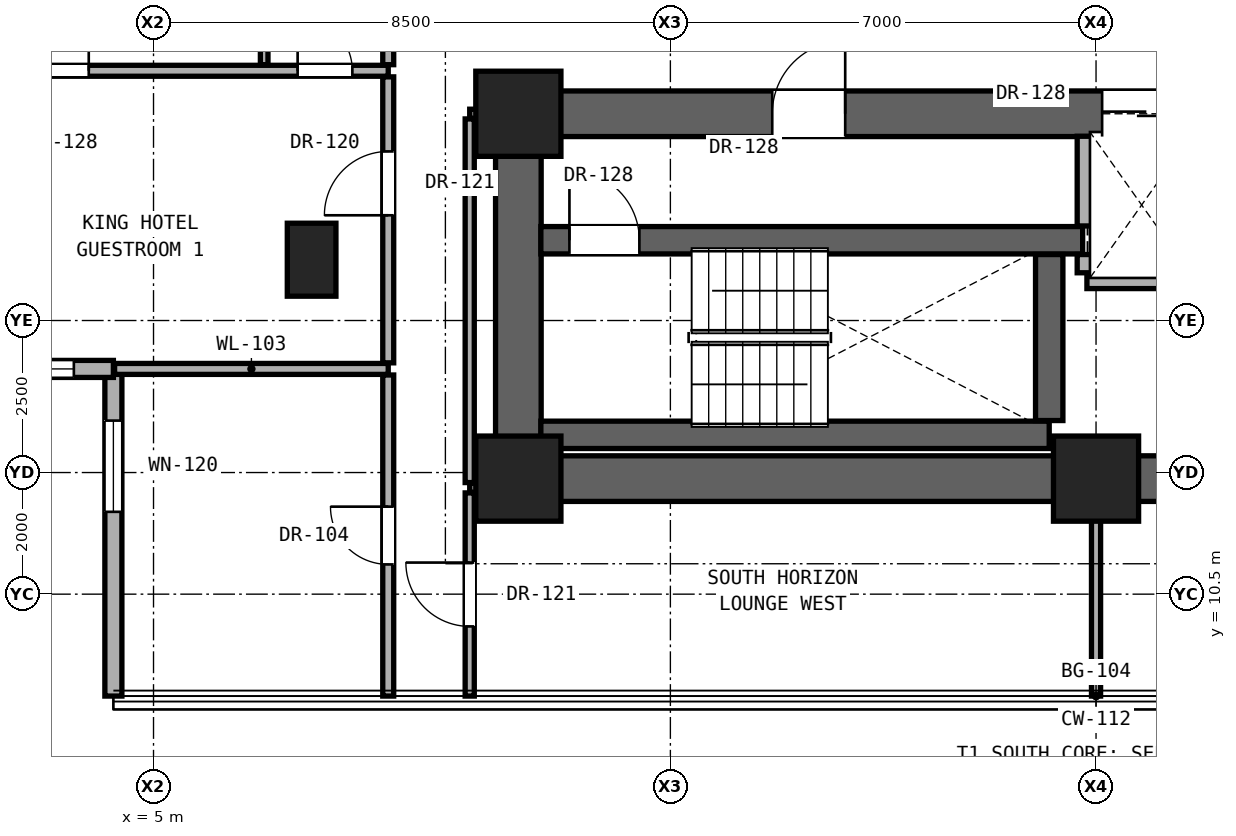
"""IFC4 building model, lengths in metres.
Left out: names, types, materials, properties, quantities, classifications, styles, units other than length and angle.
Written with IfcOpenShell. Run it as: python <this file> out.ifc"""

import sys

from ifc_helpers import new_model, si_unit, direction, frame, frame_2d, origin, origin_2d, place, context, subcontext, project, spatial, rectangle, extrude, element, fill, save


model = new_model("IFC4")
c1 = context("Model", 3, precision=1e-05, world=origin(), true_north=direction((0.0, 1.0)))
c2 = subcontext(c1, "Body", "Model", "MODEL_VIEW")
j1 = project(units=[si_unit("LENGTHUNIT", "METRE"), si_unit("PLANEANGLEUNIT", "RADIAN")], contexts=[c1])
p1 = place(None, origin())
s1 = spatial("IfcSite", under=j1, at=p1, CompositionType="ELEMENT")
p2 = place(p1, origin())
s2 = spatial("IfcBuilding", under=s1, at=p2, CompositionType="ELEMENT")
p3 = place(p2, frame((0.0, 0.0, 29.0)))
s3 = spatial("IfcBuildingStorey", under=s2, at=p3, CompositionType="ELEMENT", Elevation=29.0)
for number, where, z_axis, x_axis in (
    (1, (11.0, 12.4, 0.0), (0.0, 0.0, 1.0), (1.0, 0.0, 0.0)),
    (2, (20.5, 12.4, 0.0), (0.0, 0.0, 1.0), (1.0, 0.0, 0.0)),
    (3, (11.0, 18.4, 0.0), (0.0, 0.0, 1.0), (1.0, 0.0, 0.0)),
):
    element("IfcColumn", number, at=place(p3, frame(where, z_axis=z_axis, x_axis=x_axis)), inside=s3, PredefinedType="COLUMN", context=c2, shape_type="SweptSolid", body=[
        extrude(rectangle(XDim=1.4, YDim=1.4, at=origin_2d()), origin(), (0.0, 0.0, 1.0), 3.3),
    ])
p4 = place(p3, frame((7.6, 16.0, 0.0), z_axis=(0.0, 0.0, 1.0), x_axis=(1.0, 0.0, 0.0)))
e4 = element("IfcColumn", 4, at=p4, inside=s3, PredefinedType="PILASTER", context=c2, shape_type="SweptSolid", body=[
    extrude(rectangle(XDim=0.8, YDim=1.2, at=origin_2d()), origin(), (0.0, 0.0, 1.0), 3.3),
])
p5 = place(p3, frame((11.0, 12.4, 0.0), z_axis=(0.0, 0.0, 1.0), x_axis=(1.0, 0.0, 0.0)))
e5 = element("IfcWall", 5, at=p5, inside=s3, PredefinedType="SHEAR", context=c2, shape_type="SweptSolid", body=[
    extrude(rectangle(XDim=19.0, YDim=0.75, at=frame_2d((9.5, 0.0))), origin(), (0.0, 0.0, 1.0), 3.06),
])
p6 = place(p3, frame((11.0, 12.4, 0.0), z_axis=(0.0, 0.0, 1.0), x_axis=(0.0, 1.0, 0.0)))
e6 = element("IfcWall", 6, at=p6, inside=s3, PredefinedType="SHEAR", context=c2, shape_type="SweptSolid", body=[
    extrude(rectangle(XDim=6.0, YDim=0.75, at=frame_2d((3.0, 0.0))), origin(), (0.0, 0.0, 1.0), 3.06),
])
p7 = place(p3, frame((11.0, 18.4, 0.0), z_axis=(0.0, 0.0, 1.0), x_axis=(1.0, 0.0, 0.0)))
e7 = element("IfcWall", 7, at=p7, inside=s3, PredefinedType="SHEAR", context=c2, shape_type="SweptSolid", body=[
    extrude(rectangle(XDim=19.0, YDim=0.75, at=frame_2d((9.5, 0.0))), origin(), (0.0, 0.0, 1.0), 3.06),
])
p8 = place(p7, frame((4.175, 0.0, 0.0)))
e8 = element("IfcOpeningElement", 8, at=p8, cuts=e7, PredefinedType="OPENING", context=c2, shape_type="SweptSolid", body=[
    extrude(rectangle(XDim=1.2, YDim=2.25, at=frame_2d((0.6, 1.125))), frame((0.0, 0.385, 0.0), z_axis=(0.0, -1.0, 0.0), x_axis=(1.0, 0.0, 0.0)), (0.0, 0.0, 1.0), 0.77),
])
p9 = place(p7, frame((9.6, 0.0, 0.0)))
e9 = element("IfcOpeningElement", 9, at=p9, cuts=e7, PredefinedType="OPENING", context=c2, shape_type="SweptSolid", body=[
    extrude(rectangle(XDim=1.3, YDim=2.3, at=frame_2d((0.65, 1.15))), frame((0.0, 0.385, 0.0), z_axis=(0.0, -1.0, 0.0), x_axis=(1.0, 0.0, 0.0)), (0.0, 0.0, 1.0), 0.77),
])
p10 = place(p7, frame((11.9, 0.0, 0.0)))
e10 = element("IfcOpeningElement", 10, at=p10, cuts=e7, PredefinedType="OPENING", context=c2, shape_type="SweptSolid", body=[
    extrude(rectangle(XDim=1.3, YDim=2.3, at=frame_2d((0.65, 1.15))), frame((0.0, 0.385, 0.0), z_axis=(0.0, -1.0, 0.0), x_axis=(1.0, 0.0, 0.0)), (0.0, 0.0, 1.0), 0.77),
])
p11 = place(p7, frame((14.3, 0.0, 0.0)))
e11 = element("IfcOpeningElement", 11, at=p11, cuts=e7, PredefinedType="OPENING", context=c2, shape_type="SweptSolid", body=[
    extrude(rectangle(XDim=1.3, YDim=2.3, at=frame_2d((0.65, 1.15))), frame((0.0, 0.385, 0.0), z_axis=(0.0, -1.0, 0.0), x_axis=(1.0, 0.0, 0.0)), (0.0, 0.0, 1.0), 0.77),
])
p12 = place(p7, frame((16.6, 0.0, 0.0)))
e12 = element("IfcOpeningElement", 12, at=p12, cuts=e7, PredefinedType="OPENING", context=c2, shape_type="SweptSolid", body=[
    extrude(rectangle(XDim=1.3, YDim=2.3, at=frame_2d((0.65, 1.15))), frame((0.0, 0.385, 0.0), z_axis=(0.0, -1.0, 0.0), x_axis=(1.0, 0.0, 0.0)), (0.0, 0.0, 1.0), 0.77),
])
p13 = place(p3, frame((4.34, 14.204, 0.0), z_axis=(0.0, 0.0, 1.0), x_axis=(0.0, -1.0, 0.0)))
e13 = element("IfcWall", 13, at=p13, inside=s3, PredefinedType="SOLIDWALL", context=c2, shape_type="SweptSolid", body=[
    extrude(rectangle(XDim=5.38, YDim=0.28, at=frame_2d((2.69, 0.0))), origin(), (0.0, 0.0, 1.0), 3.04),
])
p14 = place(p13, frame((0.85, 0.0, 0.79)))
e14 = element("IfcOpeningElement", 14, at=p14, cuts=e13, PredefinedType="OPENING", context=c2, shape_type="SweptSolid", body=[
    extrude(rectangle(XDim=1.5, YDim=2.1, at=frame_2d((0.75, 1.05))), frame((0.0, 0.15, 0.0), z_axis=(0.0, -1.0, 0.0), x_axis=(1.0, 0.0, 0.0)), (0.0, 0.0, 1.0), 0.3),
])
p15 = place(p3, frame((-1.04, 14.204, 0.0), z_axis=(0.0, 0.0, 1.0), x_axis=(1.0, 0.0, 0.0)))
e15 = element("IfcWall", 15, at=p15, inside=s3, PredefinedType="SOLIDWALL", context=c2, shape_type="SweptSolid", body=[
    extrude(rectangle(XDim=5.38, YDim=0.28, at=frame_2d((2.69, 0.0))), origin(), (0.0, 0.0, 1.0), 3.04),
])
p16 = place(p15, frame((3.63, 0.0, 0.85)))
e16 = element("IfcOpeningElement", 16, at=p16, cuts=e15, PredefinedType="OPENING", context=c2, shape_type="SweptSolid", body=[
    extrude(rectangle(XDim=1.1, YDim=2.0, at=frame_2d((0.55, 1.0))), frame((0.0, 0.15, 0.0), z_axis=(0.0, -1.0, 0.0), x_axis=(1.0, 0.0, 0.0)), (0.0, 0.0, 1.0), 0.3),
])
p17 = place(p3, frame((10.2, 12.25, 0.0), z_axis=(0.0, 0.0, 1.0), x_axis=(1.0, 0.0, 0.0)))
e17 = element("IfcWall", 17, at=p17, inside=s3, PredefinedType="PARTITIONING", context=c2, shape_type="SweptSolid", body=[
    extrude(rectangle(XDim=0.43, YDim=0.15, at=frame_2d((0.215, 0.0))), origin(), (0.0, 0.0, 1.0), 3.06),
])
p18 = place(p3, frame((11.37, 13.12, 0.0), z_axis=(0.0, 0.0, 1.0), x_axis=(1.0, 0.0, 0.0)))
e18 = element("IfcWall", 18, at=p18, inside=s3, PredefinedType="SHEAR", context=c2, shape_type="SweptSolid", body=[
    extrude(rectangle(XDim=8.36, YDim=0.45, at=frame_2d((4.18, 0.0))), origin(), (0.0, 0.0, 1.0), 3.06),
])
p19 = place(p3, frame((4.36, 14.204, 0.0), z_axis=(0.0, 0.0, 1.0), x_axis=(1.0, 0.0, 0.0)))
e19 = element("IfcWall", 19, at=p19, inside=s3, PredefinedType="PARTITIONING", context=c2, shape_type="SweptSolid", body=[
    extrude(rectangle(XDim=4.5, YDim=0.18, at=frame_2d((2.25, 0.0))), origin(), (0.0, 0.0, 1.0), 3.06),
])
p20 = place(p3, frame((20.35, 15.65, 0.0), z_axis=(0.0, 0.0, 1.0), x_axis=(1.0, 0.0, 0.0)))
e20 = element("IfcWall", 20, at=p20, inside=s3, PredefinedType="SOLIDWALL", context=c2, shape_type="SweptSolid", body=[
    extrude(rectangle(XDim=4.15, YDim=0.25, at=frame_2d((2.075, 0.0))), origin(), (0.0, 0.0, 1.0), 3.06),
])
p21 = place(p3, frame((11.37, 16.32, 0.0), z_axis=(0.0, 0.0, 1.0), x_axis=(1.0, 0.0, 0.0)))
e21 = element("IfcWall", 21, at=p21, inside=s3, PredefinedType="SHEAR", context=c2, shape_type="SweptSolid", body=[
    extrude(rectangle(XDim=8.91, YDim=0.45, at=frame_2d((4.455, 0.0))), origin(), (0.0, 0.0, 1.0), 3.06),
])
p22 = place(p21, frame((0.47, 0.0, 0.0)))
e22 = element("IfcOpeningElement", 22, at=p22, cuts=e21, PredefinedType="OPENING", context=c2, shape_type="SweptSolid", body=[
    extrude(rectangle(XDim=1.15, YDim=2.2, at=frame_2d((0.575, 1.1))), frame((0.0, 0.235, 0.0), z_axis=(0.0, -1.0, 0.0), x_axis=(1.0, 0.0, 0.0)), (0.0, 0.0, 1.0), 0.47),
])
p23 = place(p3, frame((10.2, 18.4, 0.0), z_axis=(0.0, 0.0, 1.0), x_axis=(1.0, 0.0, 0.0)))
e23 = element("IfcWall", 23, at=p23, inside=s3, PredefinedType="PARTITIONING", context=c2, shape_type="SweptSolid", body=[
    extrude(rectangle(XDim=0.43, YDim=0.15, at=frame_2d((0.215, 0.0))), origin(), (0.0, 0.0, 1.0), 2.436),
])
p24 = place(p3, frame((-1.04, 19.107, 0.0), z_axis=(0.0, 0.0, 1.0), x_axis=(1.0, 0.0, 0.0)))
e24 = element("IfcWall", 24, at=p24, inside=s3, PredefinedType="PARTITIONING", context=c2, shape_type="SweptSolid", body=[
    extrude(rectangle(XDim=9.9, YDim=0.18, at=frame_2d((4.95, 0.0))), origin(), (0.0, 0.0, 1.0), 2.125),
])
p25 = place(p24, frame((4.125, 0.0, 0.0)))
e25 = element("IfcOpeningElement", 25, at=p25, cuts=e24, PredefinedType="OPENING", context=c2, shape_type="SweptSolid", body=[
    extrude(rectangle(XDim=0.85, YDim=2.01, at=frame_2d((0.425, 1.005))), frame((0.0, 0.1, 0.0), z_axis=(0.0, -1.0, 0.0), x_axis=(1.0, 0.0, 0.0)), (0.0, 0.0, 1.0), 0.2),
])
p26 = place(p24, frame((8.41, 0.0, 0.0)))
e26 = element("IfcOpeningElement", 26, at=p26, cuts=e24, PredefinedType="OPENING", context=c2, shape_type="SweptSolid", body=[
    extrude(rectangle(XDim=0.9, YDim=2.1, at=frame_2d((0.45, 1.05))), frame((0.0, 0.1, 0.0), z_axis=(0.0, -1.0, 0.0), x_axis=(1.0, 0.0, 0.0)), (0.0, 0.0, 1.0), 0.2),
])
p27 = place(p3, frame((6.82, 19.207, 0.0), z_axis=(0.0, 0.0, 1.0), x_axis=(0.0, 1.0, 0.0)))
e27 = element("IfcWall", 27, at=p27, inside=s3, PredefinedType="PARTITIONING", context=c2, shape_type="SweptSolid", body=[
    extrude(rectangle(XDim=2.52, YDim=0.125, at=frame_2d((1.26, 0.0))), origin(), (0.0, 0.0, 1.0), 3.06),
])
p28 = place(p3, frame((8.86, 8.824, 0.0), z_axis=(0.0, 0.0, 1.0), x_axis=(0.0, 1.0, 0.0)))
e28 = element("IfcWall", 28, at=p28, inside=s3, PredefinedType="PARTITIONING", context=c2, shape_type="SweptSolid", body=[
    extrude(rectangle(XDim=5.28, YDim=0.18, at=frame_2d((2.64, 0.0))), origin(), (0.0, 0.0, 1.0), 3.06),
])
p29 = place(p28, frame((2.165, 0.0, 0.0)))
e29 = element("IfcOpeningElement", 29, at=p29, cuts=e28, PredefinedType="OPENING", context=c2, shape_type="SweptSolid", body=[
    extrude(rectangle(XDim=0.95, YDim=2.15, at=frame_2d((0.475, 1.075))), frame((0.0, 0.1, 0.0), z_axis=(0.0, -1.0, 0.0), x_axis=(1.0, 0.0, 0.0)), (0.0, 0.0, 1.0), 0.2),
])
p30 = place(p3, frame((8.86, 14.304, 0.0), z_axis=(0.0, 0.0, 1.0), x_axis=(0.0, 1.0, 0.0)))
e30 = element("IfcWall", 30, at=p30, inside=s3, PredefinedType="PARTITIONING", context=c2, shape_type="SweptSolid", body=[
    extrude(rectangle(XDim=4.703, YDim=0.18, at=frame_2d((2.352, 0.0))), origin(), (0.0, 0.0, 1.0), 2.436),
])
p31 = place(p30, frame((2.427, 0.0, 0.0)))
e31 = element("IfcOpeningElement", 31, at=p31, cuts=e30, PredefinedType="OPENING", context=c2, shape_type="SweptSolid", body=[
    extrude(rectangle(XDim=1.05, YDim=2.2, at=frame_2d((0.525, 1.1))), frame((0.0, 0.1, 0.0), z_axis=(0.0, -1.0, 0.0), x_axis=(1.0, 0.0, 0.0)), (0.0, 0.0, 1.0), 0.2),
])
p32 = place(p3, frame((8.86, 19.207, 0.0), z_axis=(0.0, 0.0, 1.0), x_axis=(0.0, 1.0, 0.0)))
e32 = element("IfcWall", 32, at=p32, inside=s3, PredefinedType="PARTITIONING", context=c2, shape_type="SweptSolid", body=[
    extrude(rectangle(XDim=2.52, YDim=0.18, at=frame_2d((1.26, 0.0))), origin(), (0.0, 0.0, 1.0), 3.06),
])
p33 = place(p3, frame((10.2, 8.824, 0.0), z_axis=(0.0, 0.0, 1.0), x_axis=(0.0, 1.0, 0.0)))
e33 = element("IfcWall", 33, at=p33, inside=s3, PredefinedType="PARTITIONING", context=c2, shape_type="SweptSolid", body=[
    extrude(rectangle(XDim=3.341, YDim=0.15, at=frame_2d((1.67, 0.0))), origin(), (0.0, 0.0, 1.0), 3.06),
])
p34 = place(p33, frame((1.146, 0.0, 0.0)))
e34 = element("IfcOpeningElement", 34, at=p34, cuts=e33, PredefinedType="OPENING", context=c2, shape_type="SweptSolid", body=[
    extrude(rectangle(XDim=1.05, YDim=2.2, at=frame_2d((0.525, 1.1))), frame((0.0, 0.085, 0.0), z_axis=(0.0, -1.0, 0.0), x_axis=(1.0, 0.0, 0.0)), (0.0, 0.0, 1.0), 0.17),
])
p35 = place(p3, frame((10.2, 12.335, 0.0), z_axis=(0.0, 0.0, 1.0), x_axis=(0.0, 1.0, 0.0)))
e35 = element("IfcWall", 35, at=p35, inside=s3, PredefinedType="PARTITIONING", context=c2, shape_type="SweptSolid", body=[
    extrude(rectangle(XDim=5.98, YDim=0.15, at=frame_2d((2.99, 0.0))), origin(), (0.0, 0.0, 1.0), 2.436),
])
p36 = place(p3, frame((19.73, 13.355, 0.0), z_axis=(0.0, 0.0, 1.0), x_axis=(0.0, 1.0, 0.0)))
e36 = element("IfcWall", 36, at=p36, inside=s3, PredefinedType="SHEAR", context=c2, shape_type="SweptSolid", body=[
    extrude(rectangle(XDim=2.73, YDim=0.45, at=frame_2d((1.365, 0.0))), origin(), (0.0, 0.0, 1.0), 3.06),
])
p37 = place(p3, frame((20.315, 15.785, 0.0), z_axis=(0.0, 0.0, 1.0), x_axis=(0.0, 1.0, 0.0)))
e37 = element("IfcWall", 37, at=p37, inside=s3, PredefinedType="SOLIDWALL", context=c2, shape_type="SweptSolid", body=[
    extrude(rectangle(XDim=0.3, YDim=0.25, at=frame_2d((0.15, 0.0))), origin(), (0.0, 0.0, 1.0), 3.06),
])
p38 = place(p3, frame((20.315, 16.555, 0.0), z_axis=(0.0, 0.0, 1.0), x_axis=(0.0, 1.0, 0.0)))
e38 = element("IfcWall", 38, at=p38, inside=s3, PredefinedType="SOLIDWALL", context=c2, shape_type="SweptSolid", body=[
    extrude(rectangle(XDim=1.475, YDim=0.25, at=frame_2d((0.738, 0.0))), origin(), (0.0, 0.0, 1.0), 3.06),
])
p39 = place(p3, frame((20.5, 8.824, 0.0), z_axis=(0.0, 0.0, 1.0), x_axis=(0.0, 1.0, 0.0)))
e39 = element("IfcWall", 39, at=p39, inside=s3, PredefinedType="PARTITIONING", context=c2, shape_type="SweptSolid", body=[
    extrude(rectangle(XDim=3.206, YDim=0.15, at=frame_2d((1.603, 0.0))), origin(), (0.0, 0.0, 1.0), 3.06),
])
p40 = place(p14, origin())
e40 = element("IfcWindow", 40, at=p40, inside=s3, PartitioningType="SINGLE_PANEL", PredefinedType="WINDOW", context=c2, shape_type="SweptSolid", body=[
    extrude(rectangle(XDim=1.5, YDim=2.1, at=frame_2d((0.75, 1.05))), frame((0.0, 0.03, 0.0), z_axis=(0.0, -1.0, 0.0), x_axis=(1.0, 0.0, 0.0)), (0.0, 0.0, 1.0), 0.06),
])
fill(e14, e40)
p41 = place(p16, origin())
e41 = element("IfcWindow", 41, at=p41, inside=s3, PartitioningType="SINGLE_PANEL", PredefinedType="WINDOW", context=c2, shape_type="SweptSolid", body=[
    extrude(rectangle(XDim=1.1, YDim=2.0, at=frame_2d((0.55, 1.0))), frame((0.0, 0.03, 0.0), z_axis=(0.0, -1.0, 0.0), x_axis=(1.0, 0.0, 0.0)), (0.0, 0.0, 1.0), 0.06),
])
fill(e16, e41)
p42 = place(p8, origin())
e42 = element("IfcDoor", 42, at=p42, inside=s3, OperationType="SINGLE_SWING_RIGHT", PredefinedType="DOOR", context=c2, shape_type="SweptSolid", body=[
    extrude(rectangle(XDim=1.2, YDim=2.25, at=frame_2d((0.6, 1.125))), frame((0.0, 0.025, 0.0), z_axis=(0.0, -1.0, 0.0), x_axis=(1.0, 0.0, 0.0)), (0.0, 0.0, 1.0), 0.05),
])
fill(e8, e42)
p43 = place(p22, origin())
e43 = element("IfcDoor", 43, at=p43, inside=s3, OperationType="SINGLE_SWING_LEFT", PredefinedType="DOOR", context=c2, shape_type="SweptSolid", body=[
    extrude(rectangle(XDim=1.15, YDim=2.2, at=frame_2d((0.575, 1.1))), frame((0.0, 0.025, 0.0), z_axis=(0.0, -1.0, 0.0), x_axis=(1.0, 0.0, 0.0)), (0.0, 0.0, 1.0), 0.05),
])
fill(e22, e43)
p44 = place(p31, origin())
e44 = element("IfcDoor", 44, at=p44, inside=s3, OperationType="SINGLE_SWING_LEFT", PredefinedType="DOOR", context=c2, shape_type="SweptSolid", body=[
    extrude(rectangle(XDim=1.05, YDim=2.2, at=frame_2d((0.525, 1.1))), frame((0.0, 0.025, 0.0), z_axis=(0.0, -1.0, 0.0), x_axis=(1.0, 0.0, 0.0)), (0.0, 0.0, 1.0), 0.05),
])
fill(e31, e44)
p45 = place(p25, origin())
e45 = element("IfcDoor", 45, at=p45, inside=s3, OperationType="SINGLE_SWING_RIGHT", PredefinedType="DOOR", context=c2, shape_type="SweptSolid", body=[
    extrude(rectangle(XDim=0.85, YDim=2.01, at=frame_2d((0.425, 1.005))), frame((0.0, 0.025, 0.0), z_axis=(0.0, -1.0, 0.0), x_axis=(1.0, 0.0, 0.0)), (0.0, 0.0, 1.0), 0.05),
])
fill(e25, e45)
p46 = place(p26, origin())
e46 = element("IfcDoor", 46, at=p46, inside=s3, OperationType="SINGLE_SWING_LEFT", PredefinedType="DOOR", context=c2, shape_type="SweptSolid", body=[
    extrude(rectangle(XDim=0.9, YDim=2.1, at=frame_2d((0.45, 1.05))), frame((0.0, 0.025, 0.0), z_axis=(0.0, -1.0, 0.0), x_axis=(1.0, 0.0, 0.0)), (0.0, 0.0, 1.0), 0.05),
])
fill(e26, e46)
p47 = place(p34, origin())
e47 = element("IfcDoor", 47, at=p47, inside=s3, OperationType="SINGLE_SWING_RIGHT", PredefinedType="DOOR", context=c2, shape_type="SweptSolid", body=[
    extrude(rectangle(XDim=1.05, YDim=2.2, at=frame_2d((0.525, 1.1))), frame((0.0, 0.025, 0.0), z_axis=(0.0, -1.0, 0.0), x_axis=(1.0, 0.0, 0.0)), (0.0, 0.0, 1.0), 0.05),
])
fill(e34, e47)
p48 = place(p29, origin())
e48 = element("IfcDoor", 48, at=p48, inside=s3, OperationType="SINGLE_SWING_RIGHT", PredefinedType="DOOR", context=c2, shape_type="SweptSolid", body=[
    extrude(rectangle(XDim=0.95, YDim=2.15, at=frame_2d((0.475, 1.075))), frame((0.0, 0.025, 0.0), z_axis=(0.0, -1.0, 0.0), x_axis=(1.0, 0.0, 0.0)), (0.0, 0.0, 1.0), 0.05),
])
fill(e29, e48)
p49 = place(p9, origin())
e49 = element("IfcDoor", 49, at=p49, inside=s3, OperationType="DOUBLE_DOOR_SLIDING", PredefinedType="DOOR", context=c2, shape_type="SweptSolid", body=[
    extrude(rectangle(XDim=1.3, YDim=2.3, at=frame_2d((0.65, 1.15))), frame((0.0, 0.025, 0.0), z_axis=(0.0, -1.0, 0.0), x_axis=(1.0, 0.0, 0.0)), (0.0, 0.0, 1.0), 0.05),
])
fill(e9, e49)
save(model, sys.argv[1])
